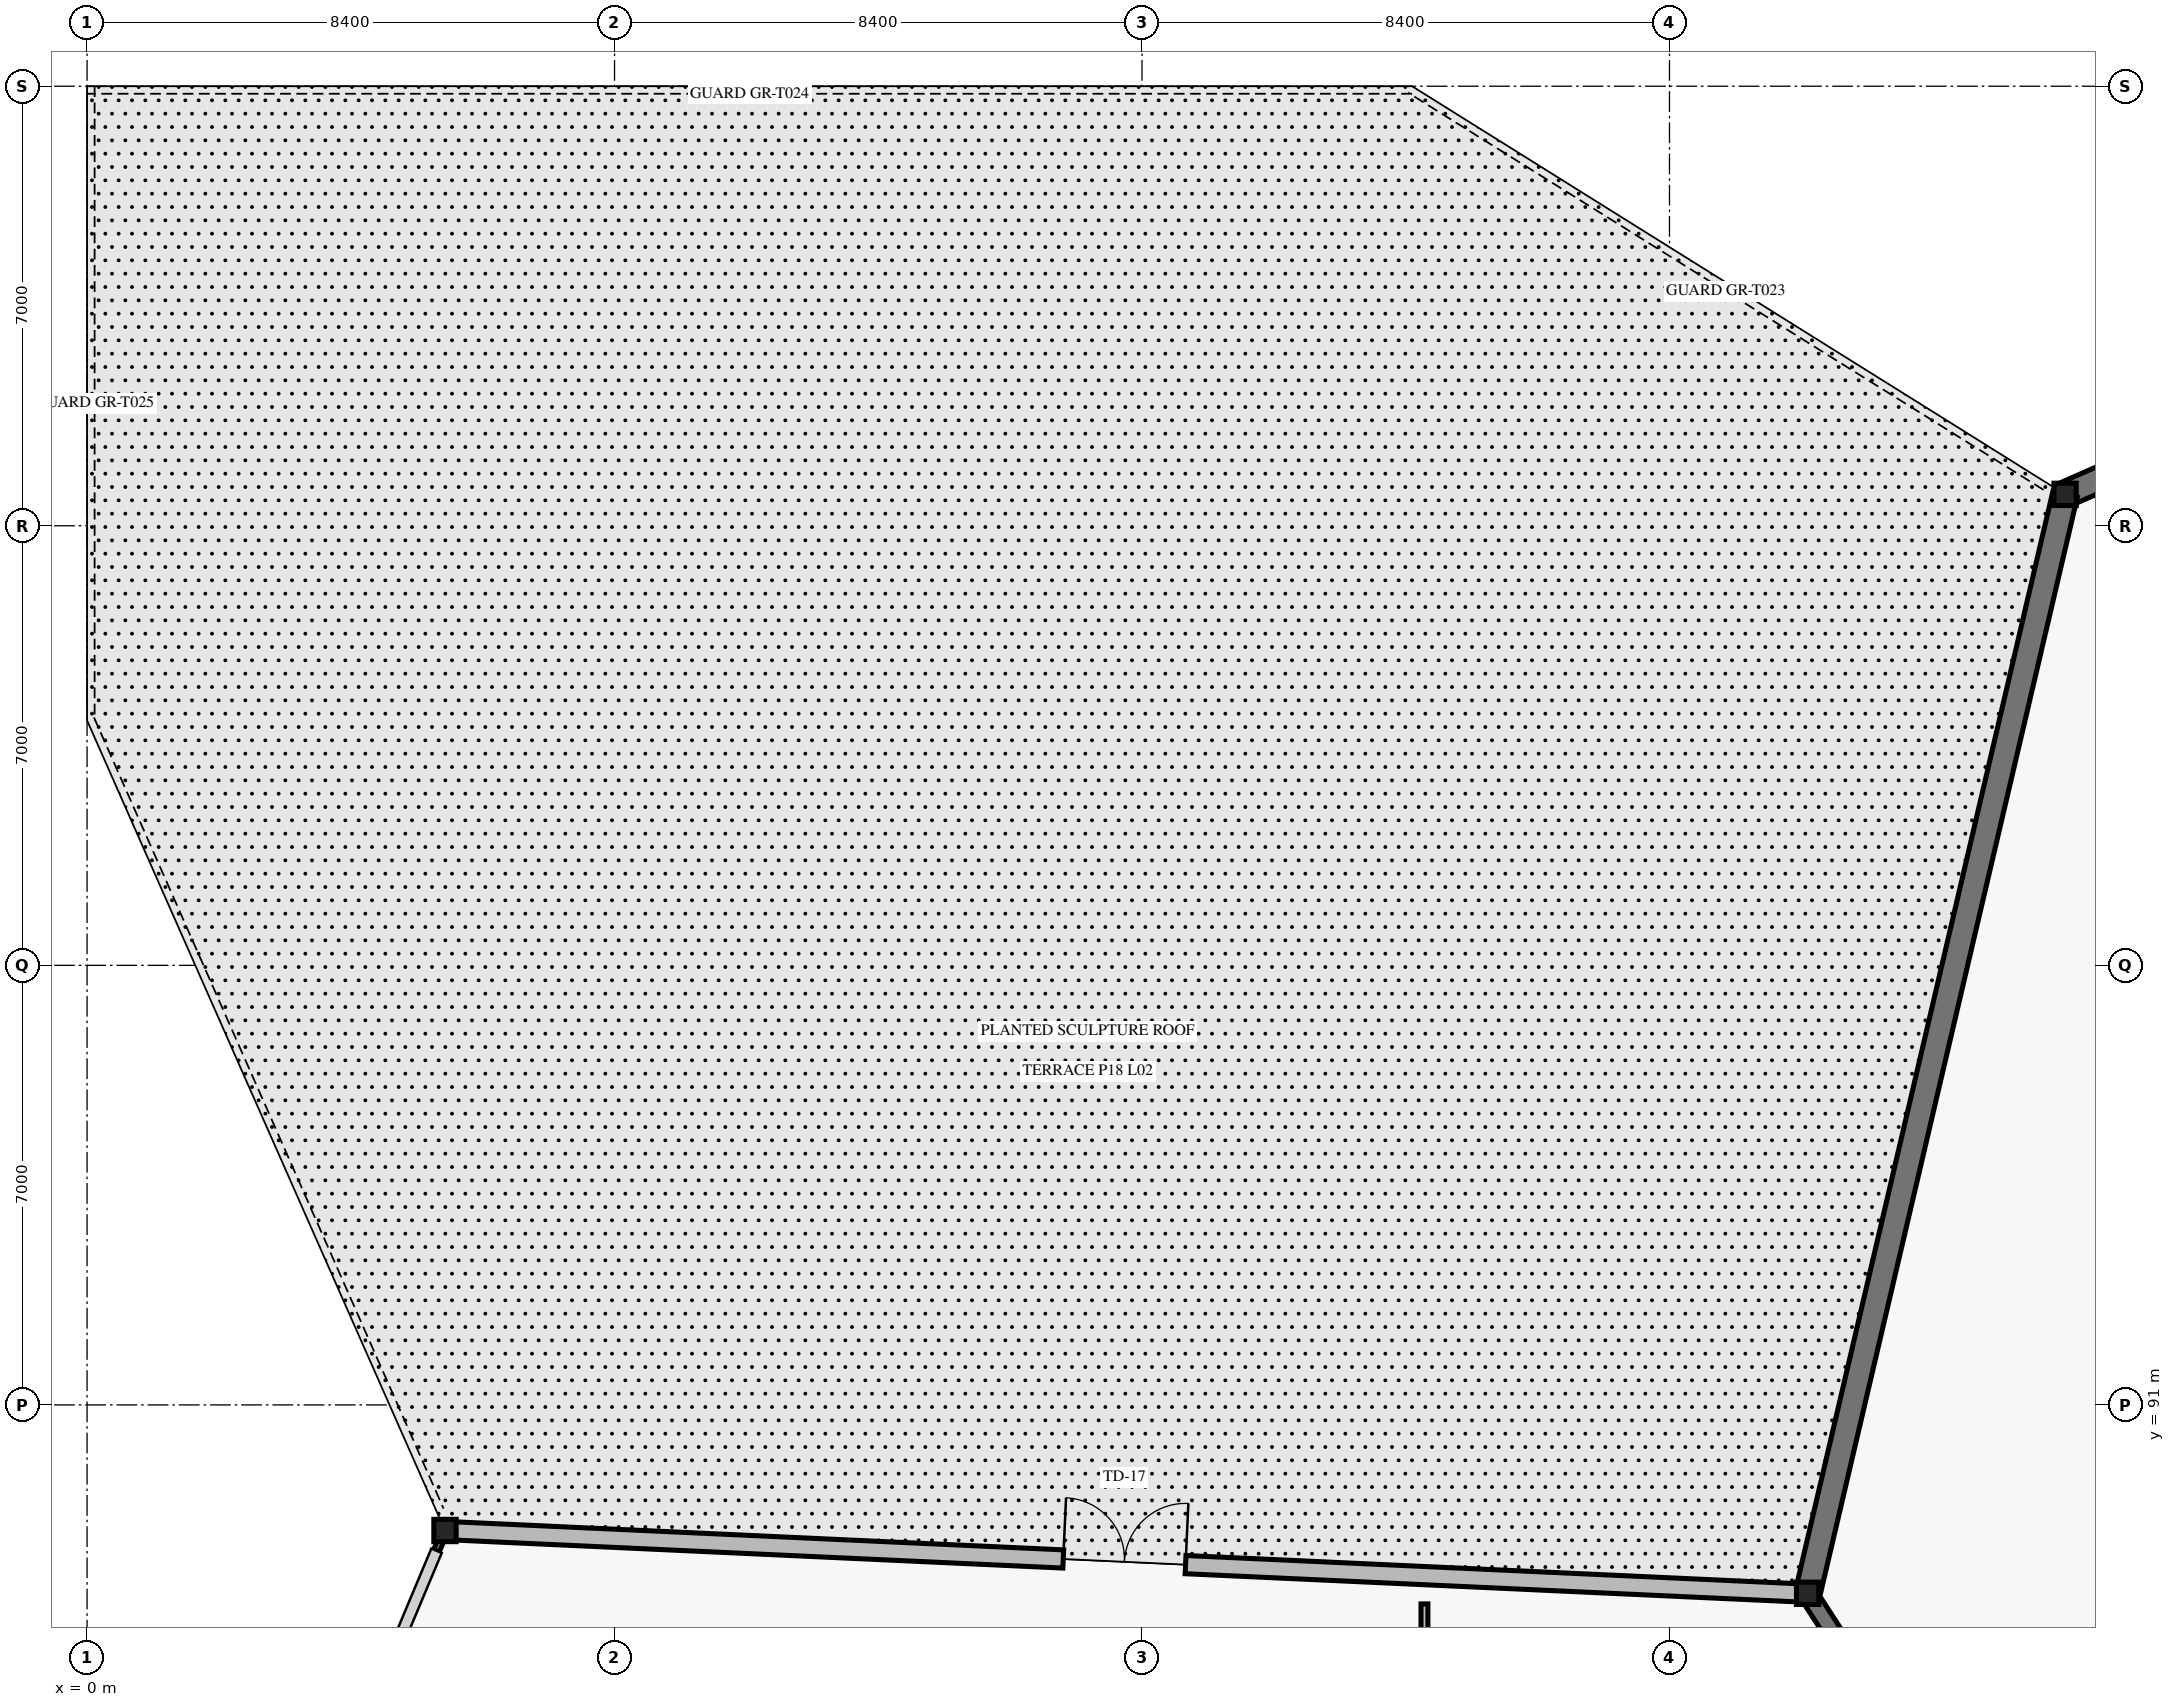
"""IFC4 building model, lengths in metres.
Left out: names, types, materials, properties, quantities, classifications, styles, units other than length and angle.
Written with IfcOpenShell. Run it as: python <this file> out.ifc"""

import sys

from ifc_helpers import new_model, si_unit, direction, frame, frame_2d, origin, origin_2d, place, context, subcontext, project, spatial, rectangle, hollow_circle, extrude, element, fill, save


model = new_model("IFC4")
c1 = context("Model", 3, precision=1e-05, world=origin(), true_north=direction((0.0, 1.0)))
c2 = subcontext(c1, "Body", "Model", "MODEL_VIEW")
j1 = project(units=[si_unit("LENGTHUNIT", "METRE"), si_unit("PLANEANGLEUNIT", "RADIAN")], contexts=[c1])
p1 = place(None, origin())
s1 = spatial("IfcSite", under=j1, at=p1, CompositionType="ELEMENT")
p2 = place(p1, origin())
s2 = spatial("IfcBuilding", under=s1, at=p2, CompositionType="ELEMENT")
p3 = place(p2, frame((0.0, 0.0, 10.2)))
s3 = spatial("IfcBuildingStorey", under=s2, at=p3, CompositionType="ELEMENT", Elevation=10.2)
for number, where, z_axis, x_axis in (
    (1, (5.7, 89.0, 0.0), (0.0, 0.0, 1.0), (1.0, 0.0, 0.0)),
    (2, (27.4, 88.0, 0.0), (0.0, 0.0, 1.0), (1.0, 0.0, 0.0)),
    (3, (31.5, 105.5, 0.0), (0.0, 0.0, 1.0), (1.0, 0.0, 0.0)),
):
    element("IfcColumn", number, at=place(p3, frame(where, z_axis=z_axis, x_axis=x_axis)), inside=s3, PredefinedType="COLUMN", context=c2, shape_type="SweptSolid", body=[
        extrude(hollow_circle(Radius=0.178, WallThickness=0.013, at=origin_2d()), origin(), (0.0, 0.0, 1.0), 4.8),
    ])
p4 = place(p3, frame((31.5, 105.5, 0.0), z_axis=(0.0, 0.0, 1.0), x_axis=(0.915568057854, 0.40216306573, 0.0)))
e4 = element("IfcWall", 4, at=p4, inside=s3, PredefinedType="SOLIDWALL", context=c2, shape_type="SweptSolid", body=[
    extrude(rectangle(XDim=11.687, YDim=0.4, at=frame_2d((5.843, 0.0))), origin(), (0.0, 0.0, 1.0), 3.62),
])
p5 = place(p3, frame((27.414, 88.058, 0.0), z_axis=(0.0, 0.0, 1.0), x_axis=(0.228085145328, 0.973641189803, 0.0)))
e5 = element("IfcWall", 5, at=p5, inside=s3, PredefinedType="SOLIDWALL", context=c2, shape_type="SweptSolid", body=[
    extrude(rectangle(XDim=17.914, YDim=0.4, at=frame_2d((8.957, 0.0))), origin(), (0.0, 0.0, 1.0), 3.62),
])
p6 = place(p3, frame((5.7, 89.0, 0.0), z_axis=(0.0, 0.0, 1.0), x_axis=(0.998940232076, -0.046026217963, 0.0)))
e6 = element("IfcWall", 6, at=p6, inside=s3, PredefinedType="SOLIDWALL", context=c2, shape_type="SweptSolid", body=[
    extrude(rectangle(XDim=21.663, YDim=0.29, at=frame_2d((10.832, 0.0))), origin(), (0.0, 0.0, 1.0), 3.62),
])
p7 = place(p6, frame((9.856, 0.0, 0.0)))
e7 = element("IfcOpeningElement", 7, at=p7, cuts=e6, PredefinedType="OPENING", context=c2, shape_type="SweptSolid", body=[
    extrude(rectangle(XDim=1.95, YDim=2.3, at=frame_2d((0.975, 1.15))), frame((0.0, 0.155, 0.0), z_axis=(0.0, -1.0, 0.0), x_axis=(1.0, 0.0, 0.0)), (0.0, 0.0, 1.0), 0.31),
])
p8 = place(p3, frame((5.565, 88.677, 0.0), z_axis=(0.0, 0.0, 1.0), x_axis=(0.386922430191, 0.922112267034, 0.0)))
e8 = element("IfcWall", 8, at=p8, inside=s3, PredefinedType="SOLIDWALL", context=c2, shape_type="SweptSolid", body=[
    extrude(rectangle(XDim=0.308, YDim=0.095, at=frame_2d((0.154, 0.0))), origin(), (0.0, 0.0, 1.0), 3.62),
])
p9 = place(p3, frame((27.4, 88.0, 0.0), z_axis=(0.0, 0.0, 1.0), x_axis=(0.542733189748, -0.839905164138, 0.0)))
e9 = element("IfcWall", 9, at=p9, inside=s3, PredefinedType="SOLIDWALL", context=c2, shape_type="SweptSolid", body=[
    extrude(rectangle(XDim=7.739, YDim=0.275, at=frame_2d((3.87, 0.0))), origin(), (0.0, 0.0, 1.0), 4.02),
])
p10 = place(p9, frame((3.069, 0.0, 0.0)))
e10 = element("IfcOpeningElement", 10, at=p10, cuts=e9, PredefinedType="OPENING", context=c2, shape_type="SweptSolid", body=[
    extrude(rectangle(XDim=1.6, YDim=2.45, at=frame_2d((0.8, 1.225))), frame((0.0, 0.147, 0.0), z_axis=(0.0, -1.0, 0.0), x_axis=(1.0, 0.0, 0.0)), (0.0, 0.0, 1.0), 0.295),
])
p11 = place(p3, frame((21.298, 65.439, 0.0), z_axis=(0.0, 0.0, 1.0), x_axis=(0.0, 1.0, 0.0)))
e11 = element("IfcWall", 11, at=p11, inside=s3, PredefinedType="PARTITIONING", context=c2, shape_type="SweptSolid", body=[
    extrude(rectangle(XDim=22.392, YDim=0.11, at=frame_2d((11.196, 0.0))), origin(), (0.0, 0.0, 1.0), 3.32),
])
p12 = place(p11, frame((10.706, 0.0, 0.0)))
e12 = element("IfcOpeningElement", 12, at=p12, cuts=e11, PredefinedType="OPENING", context=c2, shape_type="SweptSolid", body=[
    extrude(rectangle(XDim=0.98, YDim=2.15, at=frame_2d((0.49, 1.075))), frame((0.0, 0.065, 0.0), z_axis=(0.0, -1.0, 0.0), x_axis=(1.0, 0.0, 0.0)), (0.0, 0.0, 1.0), 0.13),
])
p13 = place(p7, origin())
e13 = element("IfcDoor", 13, at=p13, inside=s3, OperationType="DOUBLE_DOOR_SINGLE_SWING", PredefinedType="DOOR", context=c2, shape_type="SweptSolid", body=[
    extrude(rectangle(XDim=1.95, YDim=2.3, at=frame_2d((0.975, 1.15))), frame((0.0, 0.025, 0.0), z_axis=(0.0, -1.0, 0.0), x_axis=(1.0, 0.0, 0.0)), (0.0, 0.0, 1.0), 0.05),
])
fill(e7, e13)
save(model, sys.argv[1])
